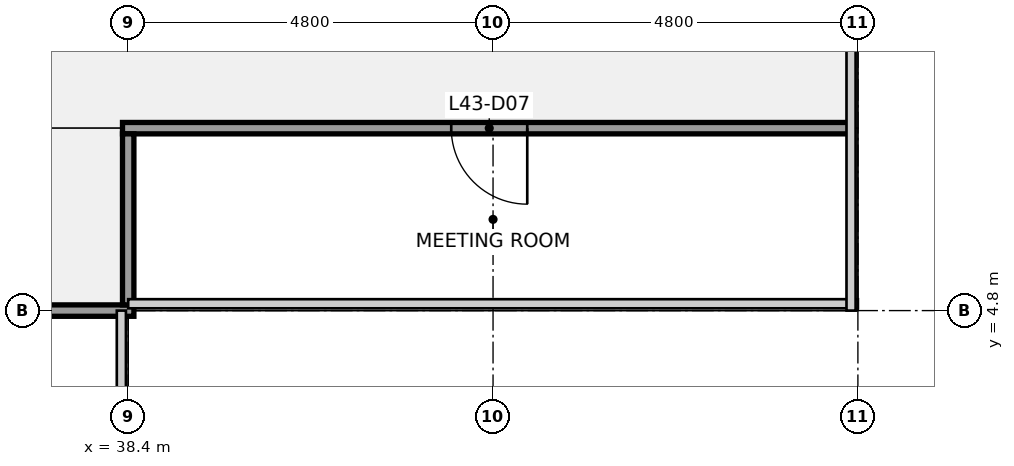
"""IFC4 building model, lengths in metres.
Left out: names, types, materials, properties, quantities, classifications, styles, units other than length and angle.
Written with IfcOpenShell. Run it as: python <this file> out.ifc"""

import sys

from ifc_helpers import new_model, si_unit, direction, frame, frame_2d, origin, place, context, subcontext, project, spatial, rectangle, extrude, element, fill, save


model = new_model("IFC4")
c1 = context("Model", 3, precision=1e-05, world=origin(), true_north=direction((0.0, 1.0)))
c2 = subcontext(c1, "Body", "Model", "MODEL_VIEW")
j1 = project(units=[si_unit("LENGTHUNIT", "METRE"), si_unit("PLANEANGLEUNIT", "RADIAN")], contexts=[c1])
p1 = place(None, origin())
s1 = spatial("IfcSite", under=j1, at=p1, CompositionType="ELEMENT")
p2 = place(p1, origin())
s2 = spatial("IfcBuilding", under=s1, at=p2, CompositionType="ELEMENT")
p3 = place(p2, frame((0.0, 0.0, 201.2)))
s3 = spatial("IfcBuildingStorey", under=s2, at=p3, CompositionType="ELEMENT", Elevation=201.2)
p4 = place(p3, frame((19.125, 4.8, 0.0), z_axis=(0.0, 0.0, 1.0), x_axis=(1.0, 0.0, 0.0)))
e1 = element("IfcWall", 1, at=p4, inside=s3, PredefinedType="PARTITIONING", context=c2, shape_type="SweptSolid", body=[
    extrude(rectangle(XDim=19.35, YDim=0.15, at=frame_2d((9.675, 0.0))), origin(), (0.0, 0.0, 1.0), 2.87),
])
p5 = place(p4, frame((4.375, 0.0, 0.0)))
e2 = element("IfcOpeningElement", 2, at=p5, cuts=e1, PredefinedType="OPENING", context=c2, shape_type="SweptSolid", body=[
    extrude(rectangle(XDim=1.0, YDim=2.1, at=frame_2d((0.5, 1.05))), frame((0.0, 0.085, 0.0), z_axis=(0.0, -1.0, 0.0), x_axis=(1.0, 0.0, 0.0)), (0.0, 0.0, 1.0), 0.17),
])
p6 = place(p4, frame((13.975, 0.0, 0.0)))
e3 = element("IfcOpeningElement", 3, at=p6, cuts=e1, PredefinedType="OPENING", context=c2, shape_type="SweptSolid", body=[
    extrude(rectangle(XDim=1.0, YDim=2.1, at=frame_2d((0.5, 1.05))), frame((0.0, 0.085, 0.0), z_axis=(0.0, -1.0, 0.0), x_axis=(1.0, 0.0, 0.0)), (0.0, 0.0, 1.0), 0.17),
])
p7 = place(p3, frame((38.325, 7.2, 0.0), z_axis=(0.0, 0.0, 1.0), x_axis=(1.0, 0.0, 0.0)))
e4 = element("IfcWall", 4, at=p7, inside=s3, PredefinedType="PARTITIONING", context=c2, shape_type="SweptSolid", body=[
    extrude(rectangle(XDim=9.575, YDim=0.15, at=frame_2d((4.788, 0.0))), origin(), (0.0, 0.0, 1.0), 2.87),
])
p8 = place(p7, frame((4.325, 0.0, 0.0)))
e5 = element("IfcOpeningElement", 5, at=p8, cuts=e4, PredefinedType="OPENING", context=c2, shape_type="SweptSolid", body=[
    extrude(rectangle(XDim=1.0, YDim=2.1, at=frame_2d((0.5, 1.05))), frame((0.0, 0.085, 0.0), z_axis=(0.0, -1.0, 0.0), x_axis=(1.0, 0.0, 0.0)), (0.0, 0.0, 1.0), 0.17),
])
p9 = place(p3, frame((38.4, 4.875, 0.0), z_axis=(0.0, 0.0, 1.0), x_axis=(0.0, 1.0, 0.0)))
e6 = element("IfcWall", 6, at=p9, inside=s3, PredefinedType="PARTITIONING", context=c2, shape_type="SweptSolid", body=[
    extrude(rectangle(XDim=2.25, YDim=0.15, at=frame_2d((1.125, 0.0))), origin(), (0.0, 0.0, 1.0), 2.87),
])
p10 = place(p8, origin())
e7 = element("IfcDoor", 7, at=p10, inside=s3, OperationType="SINGLE_SWING_RIGHT", PredefinedType="DOOR", context=c2, shape_type="SweptSolid", body=[
    extrude(rectangle(XDim=1.0, YDim=2.1, at=frame_2d((0.5, 1.05))), frame((0.0, 0.025, 0.0), z_axis=(0.0, -1.0, 0.0), x_axis=(1.0, 0.0, 0.0)), (0.0, 0.0, 1.0), 0.05),
])
fill(e5, e7)
save(model, sys.argv[1])
